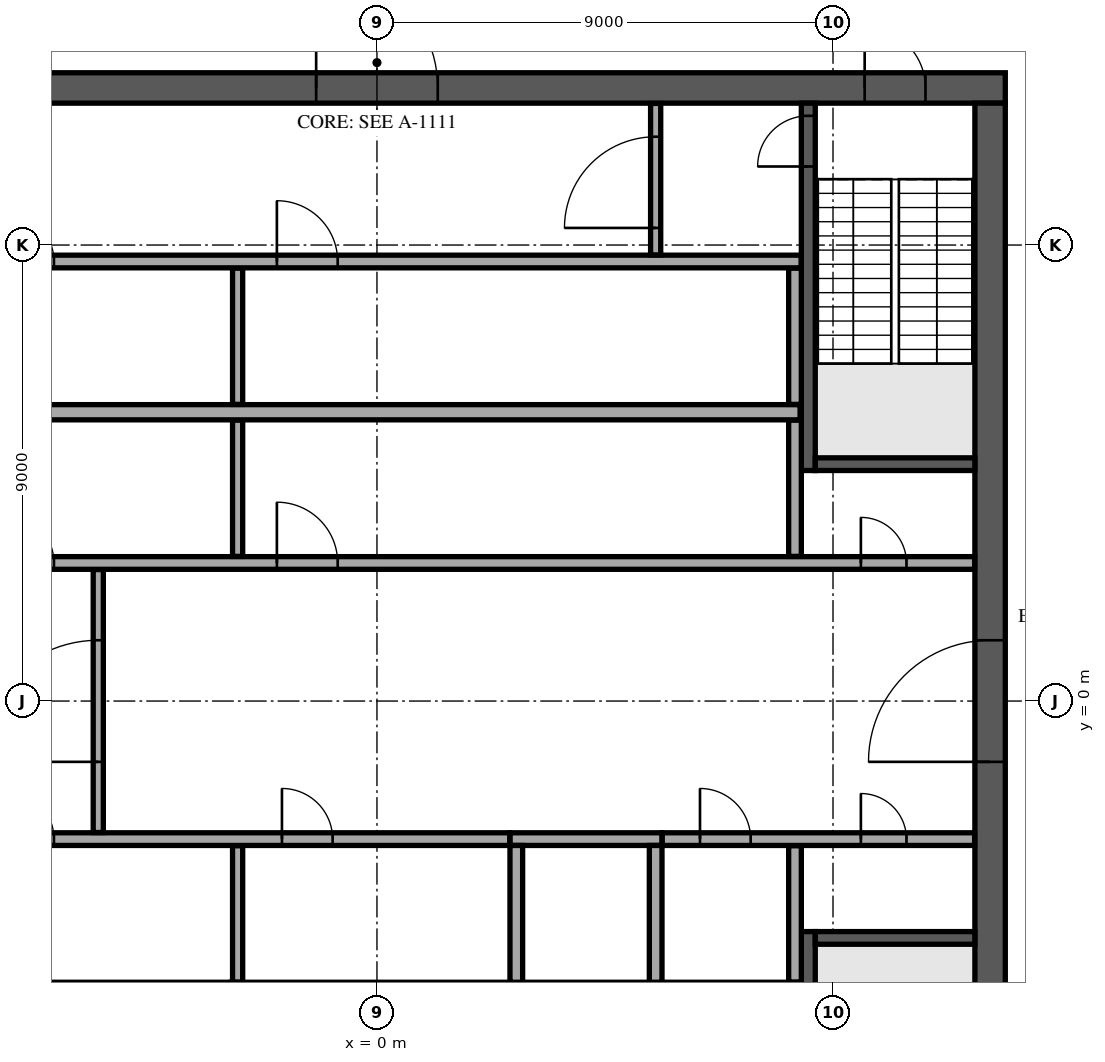
"""IFC4 building model, lengths in metres.
Left out: names, types, materials, properties, quantities, classifications, styles, units other than length and angle.
Written with IfcOpenShell. Run it as: python <this file> out.ifc"""

import sys

from ifc_helpers import new_model, si_unit, direction, frame, frame_2d, origin, place, context, subcontext, project, spatial, rectangle, extrude, element, fill, save


model = new_model("IFC4")
c1 = context("Model", 3, precision=1e-05, world=origin(), true_north=direction((0.0, 1.0)))
c2 = subcontext(c1, "Body", "Model", "MODEL_VIEW")
j1 = project(units=[si_unit("LENGTHUNIT", "METRE"), si_unit("PLANEANGLEUNIT", "RADIAN")], contexts=[c1])
p1 = place(None, origin())
s1 = spatial("IfcSite", under=j1, at=p1, CompositionType="ELEMENT")
p2 = place(p1, origin())
s2 = spatial("IfcBuilding", under=s1, at=p2, CompositionType="ELEMENT")
p3 = place(p2, frame((0.0, 0.0, 363.1)))
s3 = spatial("IfcBuildingStorey", under=s2, at=p3, CompositionType="ELEMENT", Elevation=363.1)
p4 = place(p3, frame((-12.4, 12.1, 0.0), z_axis=(0.0, 0.0, 1.0), x_axis=(1.0, 0.0, 0.0)))
e1 = element("IfcWall", 1, at=p4, inside=s3, PredefinedType="SHEAR", context=c2, shape_type="SweptSolid", body=[
    extrude(rectangle(XDim=24.8, YDim=0.6, at=frame_2d((12.4, 0.0))), origin(), (0.0, 0.0, 1.0), 4.7),
])
p5 = place(p4, frame((11.2, 0.0, 0.0)))
e2 = element("IfcOpeningElement", 2, at=p5, cuts=e1, PredefinedType="OPENING", context=c2, shape_type="SweptSolid", body=[
    extrude(rectangle(XDim=2.4, YDim=2.4, at=frame_2d((1.2, 1.2))), frame((0.0, 0.31, 0.0), z_axis=(0.0, -1.0, 0.0), x_axis=(1.0, 0.0, 0.0)), (0.0, 0.0, 1.0), 0.62),
])
p6 = place(p4, frame((22.025, 0.0, 0.0)))
e3 = element("IfcOpeningElement", 3, at=p6, cuts=e1, PredefinedType="OPENING", context=c2, shape_type="SweptSolid", body=[
    extrude(rectangle(XDim=1.2, YDim=2.1, at=frame_2d((0.6, 1.05))), frame((0.0, 0.31, 0.0), z_axis=(0.0, -1.0, 0.0), x_axis=(1.0, 0.0, 0.0)), (0.0, 0.0, 1.0), 0.62),
])
p7 = place(p4, frame((1.0, 0.0, 0.0)))
e4 = element("IfcOpeningElement", 4, at=p7, cuts=e1, PredefinedType="OPENING", context=c2, shape_type="SweptSolid", body=[
    extrude(rectangle(XDim=1.0, YDim=2.1, at=frame_2d((0.5, 1.05))), frame((0.0, 0.31, 0.0), z_axis=(0.0, -1.0, 0.0), x_axis=(1.0, 0.0, 0.0)), (0.0, 0.0, 1.0), 0.62),
])
p8 = place(p3, frame((12.1, -11.8, 0.0), z_axis=(0.0, 0.0, 1.0), x_axis=(0.0, 1.0, 0.0)))
e5 = element("IfcWall", 5, at=p8, inside=s3, PredefinedType="SHEAR", context=c2, shape_type="SweptSolid", body=[
    extrude(rectangle(XDim=23.6, YDim=0.6, at=frame_2d((11.8, 0.0))), origin(), (0.0, 0.0, 1.0), 4.7),
])
p9 = place(p8, frame((10.6, 0.0, 0.0)))
e6 = element("IfcOpeningElement", 6, at=p9, cuts=e5, PredefinedType="OPENING", context=c2, shape_type="SweptSolid", body=[
    extrude(rectangle(XDim=2.4, YDim=2.4, at=frame_2d((1.2, 1.2))), frame((0.0, 0.31, 0.0), z_axis=(0.0, -1.0, 0.0), x_axis=(1.0, 0.0, 0.0)), (0.0, 0.0, 1.0), 0.62),
])
p10 = place(p3, frame((-2.875, -5.7, 0.0), z_axis=(0.0, 0.0, 1.0), x_axis=(1.0, 0.0, 0.0)))
e7 = element("IfcWall", 7, at=p10, inside=s3, PredefinedType="SOLIDWALL", context=c2, shape_type="SweptSolid", body=[
    extrude(rectangle(XDim=11.25, YDim=0.3, at=frame_2d((5.625, 0.0))), origin(), (0.0, 0.0, 1.0), 4.7),
])
p11 = place(p3, frame((2.625, -2.725, 0.0), z_axis=(0.0, 0.0, 1.0), x_axis=(1.0, 0.0, 0.0)))
e8 = element("IfcWall", 8, at=p11, inside=s3, PredefinedType="SOLIDWALL", context=c2, shape_type="SweptSolid", body=[
    extrude(rectangle(XDim=3.0, YDim=0.25, at=frame_2d((1.5, 0.0))), origin(), (0.0, 0.0, 1.0), 4.7),
])
for number, where, z_axis, x_axis in (
    (9, (2.75, -5.55, 0.0), (0.0, 0.0, 1.0), (0.0, 1.0, 0.0)),
    (10, (5.5, -5.55, 0.0), (0.0, 0.0, 1.0), (0.0, 1.0, 0.0)),
):
    element("IfcWall", number, at=place(p3, frame(where, z_axis=z_axis, x_axis=x_axis)), inside=s3, PredefinedType="SOLIDWALL", context=c2, shape_type="SweptSolid", body=[
        extrude(rectangle(XDim=2.7, YDim=0.25, at=frame_2d((1.35, 0.0))), origin(), (0.0, 0.0, 1.0), 4.7),
    ])
p12 = place(p3, frame((8.512, 4.55, 0.0), z_axis=(0.0, 0.0, 1.0), x_axis=(0.0, 1.0, 0.0)))
e11 = element("IfcWall", 11, at=p12, inside=s3, PredefinedType="SOLIDWALL", context=c2, shape_type="SweptSolid", body=[
    extrude(rectangle(XDim=7.25, YDim=0.275, at=frame_2d((3.625, 0.0))), origin(), (0.0, 0.0, 1.0), 4.7),
])
p13 = place(p12, frame((6.0, 0.0, 0.0)))
e12 = element("IfcOpeningElement", 12, at=p13, cuts=e11, PredefinedType="OPENING", context=c2, shape_type="SweptSolid", body=[
    extrude(rectangle(XDim=1.0, YDim=2.1, at=frame_2d((0.5, 1.05))), frame((0.0, 0.147, 0.0), z_axis=(0.0, -1.0, 0.0), x_axis=(1.0, 0.0, 0.0)), (0.0, 0.0, 1.0), 0.295),
])
p14 = place(p3, frame((8.65, 4.675, 0.0), z_axis=(0.0, 0.0, 1.0), x_axis=(1.0, 0.0, 0.0)))
e13 = element("IfcWall", 13, at=p14, inside=s3, PredefinedType="SOLIDWALL", context=c2, shape_type="SweptSolid", body=[
    extrude(rectangle(XDim=3.15, YDim=0.25, at=frame_2d((1.575, 0.0))), origin(), (0.0, 0.0, 1.0), 4.7),
])
p15 = place(p3, frame((8.512, -4.55, 0.0), z_axis=(0.0, 0.0, 1.0), x_axis=(0.0, -1.0, 0.0)))
e14 = element("IfcWall", 14, at=p15, inside=s3, PredefinedType="SOLIDWALL", context=c2, shape_type="SweptSolid", body=[
    extrude(rectangle(XDim=7.25, YDim=0.275, at=frame_2d((3.625, 0.0))), origin(), (0.0, 0.0, 1.0), 4.7),
])
p16 = place(p15, frame((6.0, 0.0, 0.0)))
e15 = element("IfcOpeningElement", 15, at=p16, cuts=e14, PredefinedType="OPENING", context=c2, shape_type="SweptSolid", body=[
    extrude(rectangle(XDim=1.0, YDim=2.1, at=frame_2d((0.5, 1.05))), frame((0.0, 0.147, 0.0), z_axis=(0.0, -1.0, 0.0), x_axis=(1.0, 0.0, 0.0)), (0.0, 0.0, 1.0), 0.295),
])
p17 = place(p3, frame((8.65, -4.675, 0.0), z_axis=(0.0, 0.0, 1.0), x_axis=(1.0, 0.0, 0.0)))
e16 = element("IfcWall", 16, at=p17, inside=s3, PredefinedType="SOLIDWALL", context=c2, shape_type="SweptSolid", body=[
    extrude(rectangle(XDim=3.15, YDim=0.25, at=frame_2d((1.575, 0.0))), origin(), (0.0, 0.0, 1.0), 4.7),
])
p18 = place(p3, frame((-8.35, -5.7, 0.0), z_axis=(0.0, 0.0, 1.0), x_axis=(1.0, 0.0, 0.0)))
e17 = element("IfcWall", 17, at=p18, inside=s3, PredefinedType="PARTITIONING", context=c2, shape_type="SweptSolid", body=[
    extrude(rectangle(XDim=5.47, YDim=0.3, at=frame_2d((2.735, 0.0))), origin(), (0.0, 0.0, 1.0), 4.7),
])
p19 = place(p3, frame((-2.75, -5.545, 0.0), z_axis=(0.0, 0.0, 1.0), x_axis=(0.0, 1.0, 0.0)))
e18 = element("IfcWall", 18, at=p19, inside=s3, PredefinedType="PARTITIONING", context=c2, shape_type="SweptSolid", body=[
    extrude(rectangle(XDim=2.69, YDim=0.2, at=frame_2d((1.345, 0.0))), origin(), (0.0, 0.0, 1.0), 4.7),
])
p20 = place(p3, frame((8.25, -5.545, 0.0), z_axis=(0.0, 0.0, 1.0), x_axis=(0.0, 1.0, 0.0)))
e19 = element("IfcWall", 19, at=p20, inside=s3, PredefinedType="PARTITIONING", context=c2, shape_type="SweptSolid", body=[
    extrude(rectangle(XDim=2.69, YDim=0.25, at=frame_2d((1.345, 0.0))), origin(), (0.0, 0.0, 1.0), 4.7),
])
p21 = place(p3, frame((-11.795, -2.725, 0.0), z_axis=(0.0, 0.0, 1.0), x_axis=(1.0, 0.0, 0.0)))
e20 = element("IfcWall", 20, at=p21, inside=s3, PredefinedType="PARTITIONING", context=c2, shape_type="SweptSolid", body=[
    extrude(rectangle(XDim=14.415, YDim=0.25, at=frame_2d((7.208, 0.0))), origin(), (0.0, 0.0, 1.0), 4.7),
])
p22 = place(p21, frame((1.295, 0.0, 0.0)))
e21 = element("IfcOpeningElement", 21, at=p22, cuts=e20, PredefinedType="OPENING", context=c2, shape_type="SweptSolid", body=[
    extrude(rectangle(XDim=1.0, YDim=2.1, at=frame_2d((0.5, 1.05))), frame((0.0, 0.135, 0.0), z_axis=(0.0, -1.0, 0.0), x_axis=(1.0, 0.0, 0.0)), (0.0, 0.0, 1.0), 0.27),
])
p23 = place(p21, frame((4.42, 0.0, 0.0)))
e22 = element("IfcOpeningElement", 22, at=p23, cuts=e20, PredefinedType="OPENING", context=c2, shape_type="SweptSolid", body=[
    extrude(rectangle(XDim=1.0, YDim=2.1, at=frame_2d((0.5, 1.05))), frame((0.0, 0.135, 0.0), z_axis=(0.0, -1.0, 0.0), x_axis=(1.0, 0.0, 0.0)), (0.0, 0.0, 1.0), 0.27),
])
p24 = place(p21, frame((9.92, 0.0, 0.0)))
e23 = element("IfcOpeningElement", 23, at=p24, cuts=e20, PredefinedType="OPENING", context=c2, shape_type="SweptSolid", body=[
    extrude(rectangle(XDim=1.0, YDim=2.1, at=frame_2d((0.5, 1.05))), frame((0.0, 0.135, 0.0), z_axis=(0.0, -1.0, 0.0), x_axis=(1.0, 0.0, 0.0)), (0.0, 0.0, 1.0), 0.27),
])
p25 = place(p3, frame((5.63, -2.725, 0.0), z_axis=(0.0, 0.0, 1.0), x_axis=(1.0, 0.0, 0.0)))
e24 = element("IfcWall", 24, at=p25, inside=s3, PredefinedType="PARTITIONING", context=c2, shape_type="SweptSolid", body=[
    extrude(rectangle(XDim=6.165, YDim=0.25, at=frame_2d((3.083, 0.0))), origin(), (0.0, 0.0, 1.0), 4.7),
])
p26 = place(p25, frame((0.745, 0.0, 0.0)))
e25 = element("IfcOpeningElement", 25, at=p26, cuts=e24, PredefinedType="OPENING", context=c2, shape_type="SweptSolid", body=[
    extrude(rectangle(XDim=1.0, YDim=2.1, at=frame_2d((0.5, 1.05))), frame((0.0, 0.135, 0.0), z_axis=(0.0, -1.0, 0.0), x_axis=(1.0, 0.0, 0.0)), (0.0, 0.0, 1.0), 0.27),
])
p27 = place(p25, frame((3.92, 0.0, 0.0)))
e26 = element("IfcOpeningElement", 26, at=p27, cuts=e24, PredefinedType="OPENING", context=c2, shape_type="SweptSolid", body=[
    extrude(rectangle(XDim=0.9, YDim=2.1, at=frame_2d((0.45, 1.05))), frame((0.0, 0.135, 0.0), z_axis=(0.0, -1.0, 0.0), x_axis=(1.0, 0.0, 0.0)), (0.0, 0.0, 1.0), 0.27),
])
p28 = place(p3, frame((-5.5, -2.595, 0.0), z_axis=(0.0, 0.0, 1.0), x_axis=(0.0, 1.0, 0.0)))
e27 = element("IfcWall", 27, at=p28, inside=s3, PredefinedType="PARTITIONING", context=c2, shape_type="SweptSolid", body=[
    extrude(rectangle(XDim=5.19, YDim=0.2, at=frame_2d((2.595, 0.0))), origin(), (0.0, 0.0, 1.0), 4.7),
])
p29 = place(p28, frame((1.395, 0.0, 0.0)))
e28 = element("IfcOpeningElement", 28, at=p29, cuts=e27, PredefinedType="OPENING", context=c2, shape_type="SweptSolid", body=[
    extrude(rectangle(XDim=2.4, YDim=2.4, at=frame_2d((1.2, 1.2))), frame((0.0, 0.11, 0.0), z_axis=(0.0, -1.0, 0.0), x_axis=(1.0, 0.0, 0.0)), (0.0, 0.0, 1.0), 0.22),
])
p30 = place(p3, frame((-11.795, 2.725, 0.0), z_axis=(0.0, 0.0, 1.0), x_axis=(1.0, 0.0, 0.0)))
e29 = element("IfcWall", 29, at=p30, inside=s3, PredefinedType="PARTITIONING", context=c2, shape_type="SweptSolid", body=[
    extrude(rectangle(XDim=23.59, YDim=0.25, at=frame_2d((11.795, 0.0))), origin(), (0.0, 0.0, 1.0), 4.7),
])
p31 = place(p30, frame((21.345, 0.0, 0.0)))
e30 = element("IfcOpeningElement", 30, at=p31, cuts=e29, PredefinedType="OPENING", context=c2, shape_type="SweptSolid", body=[
    extrude(rectangle(XDim=0.9, YDim=2.1, at=frame_2d((0.45, 1.05))), frame((0.0, 0.135, 0.0), z_axis=(0.0, -1.0, 0.0), x_axis=(1.0, 0.0, 0.0)), (0.0, 0.0, 1.0), 0.27),
])
p32 = place(p30, frame((1.345, 0.0, 0.0)))
e31 = element("IfcOpeningElement", 31, at=p32, cuts=e29, PredefinedType="OPENING", context=c2, shape_type="SweptSolid", body=[
    extrude(rectangle(XDim=0.9, YDim=2.1, at=frame_2d((0.45, 1.05))), frame((0.0, 0.135, 0.0), z_axis=(0.0, -1.0, 0.0), x_axis=(1.0, 0.0, 0.0)), (0.0, 0.0, 1.0), 0.27),
])
p33 = place(p30, frame((4.42, 0.0, 0.0)))
e32 = element("IfcOpeningElement", 32, at=p33, cuts=e29, PredefinedType="OPENING", context=c2, shape_type="SweptSolid", body=[
    extrude(rectangle(XDim=1.0, YDim=2.1, at=frame_2d((0.5, 1.05))), frame((0.0, 0.135, 0.0), z_axis=(0.0, -1.0, 0.0), x_axis=(1.0, 0.0, 0.0)), (0.0, 0.0, 1.0), 0.27),
])
p34 = place(p30, frame((9.82, 0.0, 0.0)))
e33 = element("IfcOpeningElement", 33, at=p34, cuts=e29, PredefinedType="OPENING", context=c2, shape_type="SweptSolid", body=[
    extrude(rectangle(XDim=1.2, YDim=2.1, at=frame_2d((0.6, 1.05))), frame((0.0, 0.135, 0.0), z_axis=(0.0, -1.0, 0.0), x_axis=(1.0, 0.0, 0.0)), (0.0, 0.0, 1.0), 0.27),
])
p35 = place(p3, frame((-2.75, 2.855, 0.0), z_axis=(0.0, 0.0, 1.0), x_axis=(0.0, 1.0, 0.0)))
e34 = element("IfcWall", 34, at=p35, inside=s3, PredefinedType="PARTITIONING", context=c2, shape_type="SweptSolid", body=[
    extrude(rectangle(XDim=2.69, YDim=0.2, at=frame_2d((1.345, 0.0))), origin(), (0.0, 0.0, 1.0), 4.7),
])
p36 = place(p3, frame((8.25, 2.855, 0.0), z_axis=(0.0, 0.0, 1.0), x_axis=(0.0, 1.0, 0.0)))
e35 = element("IfcWall", 35, at=p36, inside=s3, PredefinedType="PARTITIONING", context=c2, shape_type="SweptSolid", body=[
    extrude(rectangle(XDim=2.69, YDim=0.25, at=frame_2d((1.345, 0.0))), origin(), (0.0, 0.0, 1.0), 4.7),
])
p37 = place(p3, frame((-8.35, 5.7, 0.0), z_axis=(0.0, 0.0, 1.0), x_axis=(1.0, 0.0, 0.0)))
e36 = element("IfcWall", 36, at=p37, inside=s3, PredefinedType="PARTITIONING", context=c2, shape_type="SweptSolid", body=[
    extrude(rectangle(XDim=16.7, YDim=0.3, at=frame_2d((8.35, 0.0))), origin(), (0.0, 0.0, 1.0), 4.7),
])
p38 = place(p3, frame((-2.75, 5.855, 0.0), z_axis=(0.0, 0.0, 1.0), x_axis=(0.0, 1.0, 0.0)))
e37 = element("IfcWall", 37, at=p38, inside=s3, PredefinedType="PARTITIONING", context=c2, shape_type="SweptSolid", body=[
    extrude(rectangle(XDim=2.69, YDim=0.2, at=frame_2d((1.345, 0.0))), origin(), (0.0, 0.0, 1.0), 4.7),
])
p39 = place(p3, frame((8.25, 5.855, 0.0), z_axis=(0.0, 0.0, 1.0), x_axis=(0.0, 1.0, 0.0)))
e38 = element("IfcWall", 38, at=p39, inside=s3, PredefinedType="PARTITIONING", context=c2, shape_type="SweptSolid", body=[
    extrude(rectangle(XDim=2.69, YDim=0.25, at=frame_2d((1.345, 0.0))), origin(), (0.0, 0.0, 1.0), 4.7),
])
p40 = place(p3, frame((-8.35, 8.675, 0.0), z_axis=(0.0, 0.0, 1.0), x_axis=(1.0, 0.0, 0.0)))
e39 = element("IfcWall", 39, at=p40, inside=s3, PredefinedType="PARTITIONING", context=c2, shape_type="SweptSolid", body=[
    extrude(rectangle(XDim=16.72, YDim=0.25, at=frame_2d((8.36, 0.0))), origin(), (0.0, 0.0, 1.0), 4.7),
])
p41 = place(p40, frame((0.975, 0.0, 0.0)))
e40 = element("IfcOpeningElement", 40, at=p41, cuts=e39, PredefinedType="OPENING", context=c2, shape_type="SweptSolid", body=[
    extrude(rectangle(XDim=1.0, YDim=2.1, at=frame_2d((0.5, 1.05))), frame((0.0, 0.135, 0.0), z_axis=(0.0, -1.0, 0.0), x_axis=(1.0, 0.0, 0.0)), (0.0, 0.0, 1.0), 0.27),
])
p42 = place(p40, frame((6.375, 0.0, 0.0)))
e41 = element("IfcOpeningElement", 41, at=p42, cuts=e39, PredefinedType="OPENING", context=c2, shape_type="SweptSolid", body=[
    extrude(rectangle(XDim=1.2, YDim=2.1, at=frame_2d((0.6, 1.05))), frame((0.0, 0.135, 0.0), z_axis=(0.0, -1.0, 0.0), x_axis=(1.0, 0.0, 0.0)), (0.0, 0.0, 1.0), 0.27),
])
p43 = place(p3, frame((5.5, 8.805, 0.0), z_axis=(0.0, 0.0, 1.0), x_axis=(0.0, 1.0, 0.0)))
e42 = element("IfcWall", 42, at=p43, inside=s3, PredefinedType="PARTITIONING", context=c2, shape_type="SweptSolid", body=[
    extrude(rectangle(XDim=2.99, YDim=0.2, at=frame_2d((1.495, 0.0))), origin(), (0.0, 0.0, 1.0), 4.7),
])
p44 = place(p43, frame((0.532, 0.0, 0.0)))
e43 = element("IfcOpeningElement", 43, at=p44, cuts=e42, PredefinedType="OPENING", context=c2, shape_type="SweptSolid", body=[
    extrude(rectangle(XDim=1.8, YDim=2.1, at=frame_2d((0.9, 1.05))), frame((0.0, 0.11, 0.0), z_axis=(0.0, -1.0, 0.0), x_axis=(1.0, 0.0, 0.0)), (0.0, 0.0, 1.0), 0.22),
])
p45 = place(p5, origin())
e44 = element("IfcDoor", 44, at=p45, inside=s3, OperationType="SINGLE_SWING_LEFT", PredefinedType="DOOR", context=c2, shape_type="SweptSolid", body=[
    extrude(rectangle(XDim=2.4, YDim=2.4, at=frame_2d((1.2, 1.2))), frame((0.0, 0.025, 0.0), z_axis=(0.0, -1.0, 0.0), x_axis=(1.0, 0.0, 0.0)), (0.0, 0.0, 1.0), 0.05),
])
fill(e2, e44)
p46 = place(p6, origin())
e45 = element("IfcDoor", 45, at=p46, inside=s3, OperationType="SINGLE_SWING_LEFT", PredefinedType="DOOR", context=c2, shape_type="SweptSolid", body=[
    extrude(rectangle(XDim=1.2, YDim=2.1, at=frame_2d((0.6, 1.05))), frame((0.0, 0.025, 0.0), z_axis=(0.0, -1.0, 0.0), x_axis=(1.0, 0.0, 0.0)), (0.0, 0.0, 1.0), 0.05),
])
fill(e3, e45)
p47 = place(p9, origin())
e46 = element("IfcDoor", 46, at=p47, inside=s3, OperationType="SINGLE_SWING_LEFT", PredefinedType="DOOR", context=c2, shape_type="SweptSolid", body=[
    extrude(rectangle(XDim=2.4, YDim=2.4, at=frame_2d((1.2, 1.2))), frame((0.0, 0.025, 0.0), z_axis=(0.0, -1.0, 0.0), x_axis=(1.0, 0.0, 0.0)), (0.0, 0.0, 1.0), 0.05),
])
fill(e6, e46)
p48 = place(p13, origin())
e47 = element("IfcDoor", 47, at=p48, inside=s3, OperationType="SINGLE_SWING_LEFT", PredefinedType="DOOR", context=c2, shape_type="SweptSolid", body=[
    extrude(rectangle(XDim=1.0, YDim=2.1, at=frame_2d((0.5, 1.05))), frame((0.0, 0.025, 0.0), z_axis=(0.0, -1.0, 0.0), x_axis=(1.0, 0.0, 0.0)), (0.0, 0.0, 1.0), 0.05),
])
fill(e12, e47)
p49 = place(p26, origin())
e48 = element("IfcDoor", 48, at=p49, inside=s3, OperationType="SINGLE_SWING_RIGHT", PredefinedType="DOOR", context=c2, shape_type="SweptSolid", body=[
    extrude(rectangle(XDim=1.0, YDim=2.1, at=frame_2d((0.5, 1.05))), frame((0.0, 0.025, 0.0), z_axis=(0.0, -1.0, 0.0), x_axis=(1.0, 0.0, 0.0)), (0.0, 0.0, 1.0), 0.05),
])
fill(e25, e48)
p50 = place(p31, origin())
e49 = element("IfcDoor", 49, at=p50, inside=s3, OperationType="SINGLE_SWING_RIGHT", PredefinedType="DOOR", context=c2, shape_type="SweptSolid", body=[
    extrude(rectangle(XDim=0.9, YDim=2.1, at=frame_2d((0.45, 1.05))), frame((0.0, 0.025, 0.0), z_axis=(0.0, -1.0, 0.0), x_axis=(1.0, 0.0, 0.0)), (0.0, 0.0, 1.0), 0.05),
])
fill(e30, e49)
p51 = place(p27, origin())
e50 = element("IfcDoor", 50, at=p51, inside=s3, OperationType="SINGLE_SWING_RIGHT", PredefinedType="DOOR", context=c2, shape_type="SweptSolid", body=[
    extrude(rectangle(XDim=0.9, YDim=2.1, at=frame_2d((0.45, 1.05))), frame((0.0, 0.025, 0.0), z_axis=(0.0, -1.0, 0.0), x_axis=(1.0, 0.0, 0.0)), (0.0, 0.0, 1.0), 0.05),
])
fill(e26, e50)
p52 = place(p33, origin())
e51 = element("IfcDoor", 51, at=p52, inside=s3, OperationType="SINGLE_SWING_RIGHT", PredefinedType="DOOR", context=c2, shape_type="SweptSolid", body=[
    extrude(rectangle(XDim=1.0, YDim=2.1, at=frame_2d((0.5, 1.05))), frame((0.0, 0.025, 0.0), z_axis=(0.0, -1.0, 0.0), x_axis=(1.0, 0.0, 0.0)), (0.0, 0.0, 1.0), 0.05),
])
fill(e32, e51)
p53 = place(p34, origin())
e52 = element("IfcDoor", 52, at=p53, inside=s3, OperationType="SINGLE_SWING_LEFT", PredefinedType="DOOR", context=c2, shape_type="SweptSolid", body=[
    extrude(rectangle(XDim=1.2, YDim=2.1, at=frame_2d((0.6, 1.05))), frame((0.0, 0.025, 0.0), z_axis=(0.0, -1.0, 0.0), x_axis=(1.0, 0.0, 0.0)), (0.0, 0.0, 1.0), 0.05),
])
fill(e33, e52)
p54 = place(p41, origin())
e53 = element("IfcDoor", 53, at=p54, inside=s3, OperationType="SINGLE_SWING_RIGHT", PredefinedType="DOOR", context=c2, shape_type="SweptSolid", body=[
    extrude(rectangle(XDim=1.0, YDim=2.1, at=frame_2d((0.5, 1.05))), frame((0.0, 0.025, 0.0), z_axis=(0.0, -1.0, 0.0), x_axis=(1.0, 0.0, 0.0)), (0.0, 0.0, 1.0), 0.05),
])
fill(e40, e53)
p55 = place(p42, origin())
e54 = element("IfcDoor", 54, at=p55, inside=s3, OperationType="SINGLE_SWING_LEFT", PredefinedType="DOOR", context=c2, shape_type="SweptSolid", body=[
    extrude(rectangle(XDim=1.2, YDim=2.1, at=frame_2d((0.6, 1.05))), frame((0.0, 0.025, 0.0), z_axis=(0.0, -1.0, 0.0), x_axis=(1.0, 0.0, 0.0)), (0.0, 0.0, 1.0), 0.05),
])
fill(e41, e54)
p56 = place(p23, origin())
e55 = element("IfcDoor", 55, at=p56, inside=s3, OperationType="SINGLE_SWING_RIGHT", PredefinedType="DOOR", context=c2, shape_type="SweptSolid", body=[
    extrude(rectangle(XDim=1.0, YDim=2.1, at=frame_2d((0.5, 1.05))), frame((0.0, 0.025, 0.0), z_axis=(0.0, -1.0, 0.0), x_axis=(1.0, 0.0, 0.0)), (0.0, 0.0, 1.0), 0.05),
])
fill(e22, e55)
p57 = place(p24, origin())
e56 = element("IfcDoor", 56, at=p57, inside=s3, OperationType="SINGLE_SWING_RIGHT", PredefinedType="DOOR", context=c2, shape_type="SweptSolid", body=[
    extrude(rectangle(XDim=1.0, YDim=2.1, at=frame_2d((0.5, 1.05))), frame((0.0, 0.025, 0.0), z_axis=(0.0, -1.0, 0.0), x_axis=(1.0, 0.0, 0.0)), (0.0, 0.0, 1.0), 0.05),
])
fill(e23, e56)
p58 = place(p29, origin())
e57 = element("IfcDoor", 57, at=p58, inside=s3, OperationType="DOUBLE_DOOR_DOUBLE_SWING", PredefinedType="DOOR", context=c2, shape_type="SweptSolid", body=[
    extrude(rectangle(XDim=2.4, YDim=2.4, at=frame_2d((1.2, 1.2))), frame((0.0, 0.025, 0.0), z_axis=(0.0, -1.0, 0.0), x_axis=(1.0, 0.0, 0.0)), (0.0, 0.0, 1.0), 0.05),
])
fill(e28, e57)
p59 = place(p44, origin())
e58 = element("IfcDoor", 58, at=p59, inside=s3, OperationType="SINGLE_SWING_LEFT", PredefinedType="DOOR", context=c2, shape_type="SweptSolid", body=[
    extrude(rectangle(XDim=1.8, YDim=2.1, at=frame_2d((0.9, 1.05))), frame((0.0, 0.025, 0.0), z_axis=(0.0, -1.0, 0.0), x_axis=(1.0, 0.0, 0.0)), (0.0, 0.0, 1.0), 0.05),
])
fill(e43, e58)
save(model, sys.argv[1])
